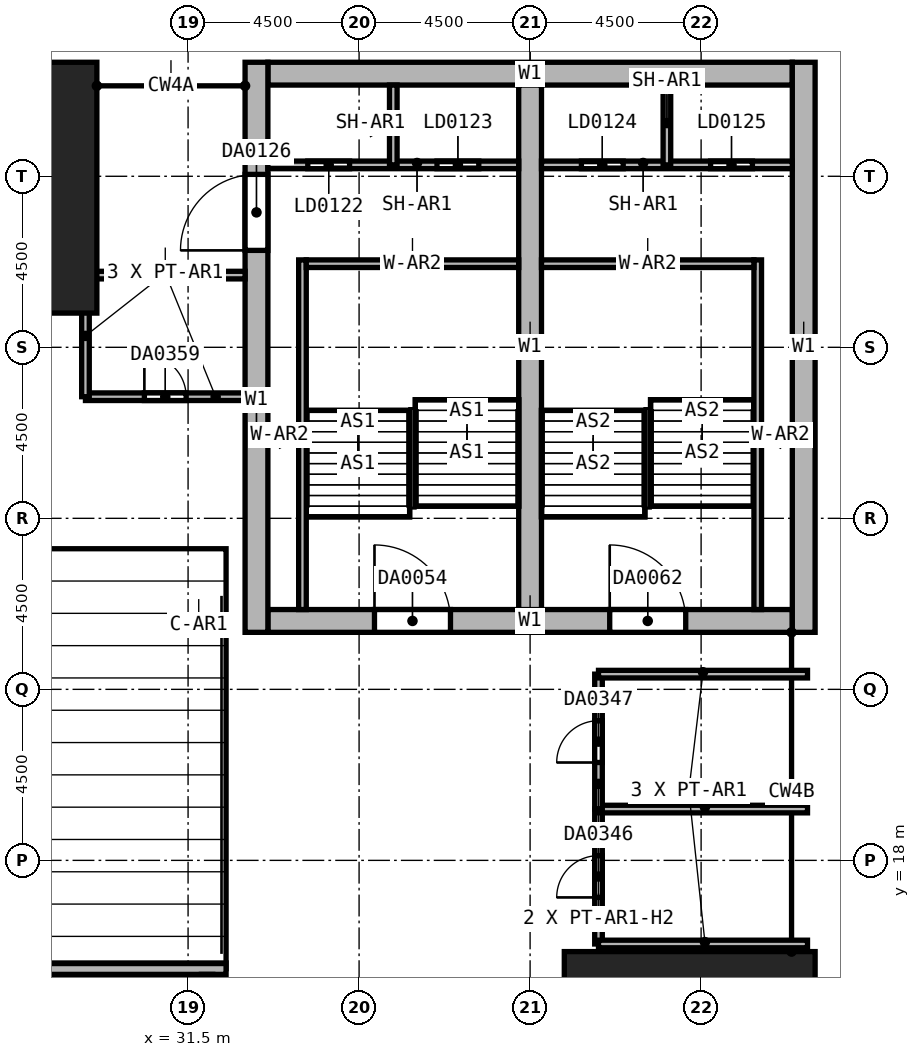
"""IFC4 building model, lengths in metres.
Left out: names, types, materials, properties, quantities, classifications, styles, units other than length and angle.
Written with IfcOpenShell. Run it as: python <this file> out.ifc"""

import sys

from ifc_helpers import new_model, si_unit, direction, frame, frame_2d, origin, origin_2d, place, context, subcontext, project, spatial, rectangle, hollow_rectangle, extrude, element, fill, save


model = new_model("IFC4")
c1 = context("Model", 3, precision=1e-05, world=origin(), true_north=direction((0.0, 1.0)))
c2 = subcontext(c1, "Body", "Model", "MODEL_VIEW")
j1 = project(units=[si_unit("LENGTHUNIT", "METRE"), si_unit("PLANEANGLEUNIT", "RADIAN")], contexts=[c1])
p1 = place(None, origin())
s1 = spatial("IfcSite", under=j1, at=p1, CompositionType="ELEMENT")
p2 = place(p1, origin())
s2 = spatial("IfcBuilding", under=s1, at=p2, CompositionType="ELEMENT")
p3 = place(p2, frame((0.0, 0.0, 12.0)))
s3 = spatial("IfcBuildingStorey", under=s2, at=p3, CompositionType="ELEMENT", Elevation=12.0)
for number, where, z_axis, x_axis in (
    (1, (27.0, 35.7, 0.0), (0.0, 0.0, 1.0), (1.0, 0.0, 0.0)),
    (2, (44.7, 13.5, 0.0), (0.0, 0.0, 1.0), (0.0, 1.0, 0.0)),
):
    element("IfcColumn", number, at=place(p3, frame(where, z_axis=z_axis, x_axis=x_axis)), inside=s3, PredefinedType="COLUMN", context=c2, shape_type="SweptSolid", body=[
        extrude(rectangle(XDim=4.2, YDim=6.6, at=origin_2d()), origin(), (0.0, 0.0, 1.0), 7.0),
    ])
p4 = place(p3, frame((33.6, 38.7, 0.0), z_axis=(0.0, 0.0, 1.0), x_axis=(1.0, 0.0, 0.0)))
e3 = element("IfcWall", 3, at=p4, inside=s3, PredefinedType="SHEAR", context=c2, shape_type="SweptSolid", body=[
    extrude(rectangle(XDim=13.8, YDim=0.6, at=frame_2d((6.9, 0.0))), origin(), (0.0, 0.0, 1.0), 7.0),
])
p5 = place(p3, frame((33.6, 24.3, 0.0), z_axis=(0.0, 0.0, 1.0), x_axis=(1.0, 0.0, 0.0)))
e4 = element("IfcWall", 4, at=p5, inside=s3, PredefinedType="SHEAR", context=c2, shape_type="SweptSolid", body=[
    extrude(rectangle(XDim=13.8, YDim=0.6, at=frame_2d((6.9, 0.0))), origin(), (0.0, 0.0, 1.0), 7.0),
])
p6 = place(p5, frame((2.805, 0.0, 0.0)))
e5 = element("IfcOpeningElement", 5, at=p6, cuts=e4, PredefinedType="OPENING", context=c2, shape_type="SweptSolid", body=[
    extrude(rectangle(XDim=2.0, YDim=2.4, at=frame_2d((1.0, 1.2))), frame((0.0, 0.3, 0.0), z_axis=(0.0, -1.0, 0.0), x_axis=(1.0, 0.0, 0.0)), (0.0, 0.0, 1.0), 0.6),
])
p7 = place(p5, frame((8.995, 0.0, 0.0)))
e6 = element("IfcOpeningElement", 6, at=p7, cuts=e4, PredefinedType="OPENING", context=c2, shape_type="SweptSolid", body=[
    extrude(rectangle(XDim=2.0, YDim=2.4, at=frame_2d((1.0, 1.2))), frame((0.0, 0.3, 0.0), z_axis=(0.0, -1.0, 0.0), x_axis=(1.0, 0.0, 0.0)), (0.0, 0.0, 1.0), 0.6),
])
p8 = place(p3, frame((33.3, 24.0, 0.0), z_axis=(0.0, 0.0, 1.0), x_axis=(0.0, 1.0, 0.0)))
e7 = element("IfcWall", 7, at=p8, inside=s3, PredefinedType="SHEAR", context=c2, shape_type="SweptSolid", body=[
    extrude(rectangle(XDim=15.0, YDim=0.6, at=frame_2d((7.5, 0.0))), origin(), (0.0, 0.0, 1.0), 7.0),
])
p9 = place(p8, frame((10.05, 0.0, 0.0)))
e8 = element("IfcOpeningElement", 8, at=p9, cuts=e7, PredefinedType="OPENING", context=c2, shape_type="SweptSolid", body=[
    extrude(rectangle(XDim=2.0, YDim=2.4, at=frame_2d((1.0, 1.2))), frame((0.0, 0.3, 0.0), z_axis=(0.0, -1.0, 0.0), x_axis=(1.0, 0.0, 0.0)), (0.0, 0.0, 1.0), 0.6),
])
p10 = place(p3, frame((47.7, 24.0, 0.0), z_axis=(0.0, 0.0, 1.0), x_axis=(0.0, 1.0, 0.0)))
e9 = element("IfcWall", 9, at=p10, inside=s3, PredefinedType="SHEAR", context=c2, shape_type="SweptSolid", body=[
    extrude(rectangle(XDim=15.0, YDim=0.6, at=frame_2d((7.5, 0.0))), origin(), (0.0, 0.0, 1.0), 7.0),
])
p11 = place(p3, frame((40.5, 24.6, 0.0), z_axis=(0.0, 0.0, 1.0), x_axis=(0.0, 1.0, 0.0)))
e10 = element("IfcWall", 10, at=p11, inside=s3, PredefinedType="SHEAR", context=c2, shape_type="SweptSolid", body=[
    extrude(rectangle(XDim=13.8, YDim=0.6, at=frame_2d((6.9, 0.0))), origin(), (0.0, 0.0, 1.0), 7.0),
])
p12 = place(p3, frame((-14.1, 15.15, 0.0), z_axis=(0.0, 0.0, 1.0), x_axis=(1.0, 0.0, 0.0)))
e11 = element("IfcWall", 11, at=p12, inside=s3, PredefinedType="SOLIDWALL", context=c2, shape_type="SweptSolid", body=[
    extrude(rectangle(XDim=46.6, YDim=0.3, at=frame_2d((23.3, 0.0))), origin(), (0.0, 0.0, 1.0), 2.125),
])
p13 = place(p3, frame((32.0, 1.95, 0.0), z_axis=(0.0, 0.0, 1.0), x_axis=(0.0, 1.0, 0.0)))
e12 = element("IfcWall", 12, at=p13, inside=s3, PredefinedType="SOLIDWALL", context=c2, shape_type="SweptSolid", body=[
    extrude(rectangle(XDim=13.05, YDim=0.3, at=frame_2d((6.525, 0.0))), origin(), (0.0, 0.0, 1.0), 2.0),
])
p14 = place(p3, frame((31.78, 24.2, 0.0), z_axis=(0.0, 0.0, 1.0), x_axis=(1.0, 0.0, 0.0)))
e13 = element("IfcColumn", 13, at=p14, inside=s3, PredefinedType="COLUMN", context=c2, shape_type="SweptSolid", body=[
    extrude(hollow_rectangle(XDim=0.5, YDim=0.6, WallThickness=0.03, at=origin_2d()), origin(), (0.0, 0.0, 1.0), 5.712),
])
p15 = place(p3, frame((34.51, 24.6, 0.0), z_axis=(0.0, 0.0, 1.0), x_axis=(0.0, 1.0, 0.0)))
e14 = element("IfcWall", 14, at=p15, inside=s3, PredefinedType="SOLIDWALL", context=c2, shape_type="SweptSolid", body=[
    extrude(rectangle(XDim=9.2, YDim=0.2, at=frame_2d((4.6, 0.0))), origin(), (0.0, 0.0, 1.0), 7.0),
])
p16 = place(p3, frame((34.61, 33.7, 0.0), z_axis=(0.0, 0.0, 1.0), x_axis=(1.0, 0.0, 0.0)))
e15 = element("IfcWall", 15, at=p16, inside=s3, PredefinedType="SOLIDWALL", context=c2, shape_type="SweptSolid", body=[
    extrude(rectangle(XDim=5.59, YDim=0.2, at=frame_2d((2.795, 0.0))), origin(), (0.0, 0.0, 1.0), 7.0),
])
p17 = place(p3, frame((46.49, 24.6, 0.0), z_axis=(0.0, 0.0, 1.0), x_axis=(0.0, 1.0, 0.0)))
e16 = element("IfcWall", 16, at=p17, inside=s3, PredefinedType="SOLIDWALL", context=c2, shape_type="SweptSolid", body=[
    extrude(rectangle(XDim=9.2, YDim=0.2, at=frame_2d((4.6, 0.0))), origin(), (0.0, 0.0, 1.0), 7.0),
])
p18 = place(p3, frame((40.8, 33.7, 0.0), z_axis=(0.0, 0.0, 1.0), x_axis=(1.0, 0.0, 0.0)))
e17 = element("IfcWall", 17, at=p18, inside=s3, PredefinedType="SOLIDWALL", context=c2, shape_type="SweptSolid", body=[
    extrude(rectangle(XDim=5.59, YDim=0.2, at=frame_2d((2.795, 0.0))), origin(), (0.0, 0.0, 1.0), 7.0),
])
p19 = place(p3, frame((33.6, 36.3, 0.0), z_axis=(0.0, 0.0, 1.0), x_axis=(1.0, 0.0, 0.0)))
e18 = element("IfcWall", 18, at=p19, inside=s3, PredefinedType="SHEAR", context=c2, shape_type="SweptSolid", body=[
    extrude(rectangle(XDim=6.6, YDim=0.2, at=frame_2d((3.3, 0.0))), origin(), (0.0, 0.0, 1.0), 7.0),
])
p20 = place(p19, frame((1.05, 0.0, 0.0)))
e19 = element("IfcOpeningElement", 19, at=p20, cuts=e18, PredefinedType="OPENING", context=c2, shape_type="SweptSolid", body=[
    extrude(rectangle(XDim=1.1, YDim=2.4, at=frame_2d((0.55, 1.2))), frame((0.0, 0.1, 0.0), z_axis=(0.0, -1.0, 0.0), x_axis=(1.0, 0.0, 0.0)), (0.0, 0.0, 1.0), 0.2),
])
p21 = place(p19, frame((4.45, 0.0, 0.0)))
e20 = element("IfcOpeningElement", 20, at=p21, cuts=e18, PredefinedType="OPENING", context=c2, shape_type="SweptSolid", body=[
    extrude(rectangle(XDim=1.1, YDim=2.4, at=frame_2d((0.55, 1.2))), frame((0.0, 0.1, 0.0), z_axis=(0.0, -1.0, 0.0), x_axis=(1.0, 0.0, 0.0)), (0.0, 0.0, 1.0), 0.2),
])
p22 = place(p3, frame((40.8, 36.3, 0.0), z_axis=(0.0, 0.0, 1.0), x_axis=(1.0, 0.0, 0.0)))
e21 = element("IfcWall", 21, at=p22, inside=s3, PredefinedType="SHEAR", context=c2, shape_type="SweptSolid", body=[
    extrude(rectangle(XDim=6.6, YDim=0.2, at=frame_2d((3.3, 0.0))), origin(), (0.0, 0.0, 1.0), 7.0),
])
p23 = place(p22, frame((1.05, 0.0, 0.0)))
e22 = element("IfcOpeningElement", 22, at=p23, cuts=e21, PredefinedType="OPENING", context=c2, shape_type="SweptSolid", body=[
    extrude(rectangle(XDim=1.1, YDim=2.4, at=frame_2d((0.55, 1.2))), frame((0.0, 0.1, 0.0), z_axis=(0.0, -1.0, 0.0), x_axis=(1.0, 0.0, 0.0)), (0.0, 0.0, 1.0), 0.2),
])
p24 = place(p22, frame((4.45, 0.0, 0.0)))
e23 = element("IfcOpeningElement", 23, at=p24, cuts=e21, PredefinedType="OPENING", context=c2, shape_type="SweptSolid", body=[
    extrude(rectangle(XDim=1.1, YDim=2.4, at=frame_2d((0.55, 1.2))), frame((0.0, 0.1, 0.0), z_axis=(0.0, -1.0, 0.0), x_axis=(1.0, 0.0, 0.0)), (0.0, 0.0, 1.0), 0.2),
])
for number, where, z_axis, x_axis in (
    (24, (36.9, 36.3, 0.0), (0.0, 0.0, 1.0), (0.0, 1.0, 0.0)),
    (25, (44.1, 36.3, 0.0), (0.0, 0.0, 1.0), (0.0, 1.0, 0.0)),
):
    element("IfcWall", number, at=place(p3, frame(where, z_axis=z_axis, x_axis=x_axis)), inside=s3, PredefinedType="SHEAR", context=c2, shape_type="SweptSolid", body=[
        extrude(rectangle(XDim=2.1, YDim=0.2, at=frame_2d((1.05, 0.0))), origin(), (0.0, 0.0, 1.0), 7.0),
    ])
p25 = place(p3, frame((42.3, 15.8, 0.0), z_axis=(0.0, 0.0, 1.0), x_axis=(0.0, 1.0, 0.0)))
e26 = element("IfcWall", 26, at=p25, inside=s3, PredefinedType="PARTITIONING", context=c2, shape_type="SweptSolid", body=[
    extrude(rectangle(XDim=3.55, YDim=0.2, at=frame_2d((1.775, 0.0))), origin(), (0.0, 0.0, 1.0), 5.5),
])
p26 = place(p25, frame((1.225, 0.0, 0.0)))
e27 = element("IfcOpeningElement", 27, at=p26, cuts=e26, PredefinedType="OPENING", context=c2, shape_type="SweptSolid", body=[
    extrude(rectangle(XDim=1.1, YDim=2.4, at=frame_2d((0.55, 1.2))), frame((0.0, 0.1, 0.0), z_axis=(0.0, -1.0, 0.0), x_axis=(1.0, 0.0, 0.0)), (0.0, 0.0, 1.0), 0.2),
])
for number, where, z_axis, x_axis in (
    (28, (42.3, 15.8, 0.0), (0.0, 0.0, 1.0), (1.0, 0.0, 0.0)),
    (29, (42.3, 19.35, 0.0), (0.0, 0.0, 1.0), (1.0, 0.0, 0.0)),
):
    element("IfcWall", number, at=place(p3, frame(where, z_axis=z_axis, x_axis=x_axis)), inside=s3, PredefinedType="PARTITIONING", context=c2, shape_type="SweptSolid", body=[
        extrude(rectangle(XDim=5.5, YDim=0.2, at=frame_2d((2.75, 0.0))), origin(), (0.0, 0.0, 1.0), 6.7),
    ])
p27 = place(p3, frame((42.3, 19.35, 0.0), z_axis=(0.0, 0.0, 1.0), x_axis=(0.0, 1.0, 0.0)))
e30 = element("IfcWall", 30, at=p27, inside=s3, PredefinedType="PARTITIONING", context=c2, shape_type="SweptSolid", body=[
    extrude(rectangle(XDim=3.55, YDim=0.2, at=frame_2d((1.775, 0.0))), origin(), (0.0, 0.0, 1.0), 5.5),
])
p28 = place(p27, frame((1.225, 0.0, 0.0)))
e31 = element("IfcOpeningElement", 31, at=p28, cuts=e30, PredefinedType="OPENING", context=c2, shape_type="SweptSolid", body=[
    extrude(rectangle(XDim=1.1, YDim=2.4, at=frame_2d((0.55, 1.2))), frame((0.0, 0.1, 0.0), z_axis=(0.0, -1.0, 0.0), x_axis=(1.0, 0.0, 0.0)), (0.0, 0.0, 1.0), 0.2),
])
p29 = place(p3, frame((42.3, 22.9, 0.0), z_axis=(0.0, 0.0, 1.0), x_axis=(1.0, 0.0, 0.0)))
e32 = element("IfcWall", 32, at=p29, inside=s3, PredefinedType="PARTITIONING", context=c2, shape_type="SweptSolid", body=[
    extrude(rectangle(XDim=5.5, YDim=0.2, at=frame_2d((2.75, 0.0))), origin(), (0.0, 0.0, 1.0), 6.7),
])
p30 = place(p3, frame((28.8, 30.2, 0.0), z_axis=(0.0, 0.0, 1.0), x_axis=(1.0, 0.0, 0.0)))
e33 = element("IfcWall", 33, at=p30, inside=s3, PredefinedType="PARTITIONING", context=c2, shape_type="SweptSolid", body=[
    extrude(rectangle(XDim=4.2, YDim=0.2, at=frame_2d((2.1, 0.0))), origin(), (0.0, 0.0, 1.0), 6.7),
])
p31 = place(p30, frame((1.55, 0.0, 0.0)))
e34 = element("IfcOpeningElement", 34, at=p31, cuts=e33, PredefinedType="OPENING", context=c2, shape_type="SweptSolid", body=[
    extrude(rectangle(XDim=1.1, YDim=2.4, at=frame_2d((0.55, 1.2))), frame((0.0, 0.1, 0.0), z_axis=(0.0, -1.0, 0.0), x_axis=(1.0, 0.0, 0.0)), (0.0, 0.0, 1.0), 0.2),
])
p32 = place(p3, frame((28.8, 30.2, 0.0), z_axis=(0.0, 0.0, 1.0), x_axis=(0.0, 1.0, 0.0)))
e35 = element("IfcWall", 35, at=p32, inside=s3, PredefinedType="PARTITIONING", context=c2, shape_type="SweptSolid", body=[
    extrude(rectangle(XDim=3.2, YDim=0.2, at=frame_2d((1.6, 0.0))), origin(), (0.0, 0.0, 1.0), 6.7),
])
p33 = place(p3, frame((28.8, 33.4, 0.0), z_axis=(0.0, 0.0, 1.0), x_axis=(1.0, 0.0, 0.0)))
e36 = element("IfcWall", 36, at=p33, inside=s3, PredefinedType="PARTITIONING", context=c2, shape_type="SweptSolid", body=[
    extrude(rectangle(XDim=4.2, YDim=0.2, at=frame_2d((2.1, 0.0))), origin(), (0.0, 0.0, 1.0), 6.7),
])
p34 = place(p6, origin())
e37 = element("IfcDoor", 37, at=p34, inside=s3, OperationType="DOUBLE_DOOR_SINGLE_SWING", PredefinedType="DOOR", context=c2, shape_type="SweptSolid", body=[
    extrude(rectangle(XDim=2.0, YDim=2.4, at=frame_2d((1.0, 1.2))), frame((0.0, 0.025, 0.0), z_axis=(0.0, -1.0, 0.0), x_axis=(1.0, 0.0, 0.0)), (0.0, 0.0, 1.0), 0.05),
])
fill(e5, e37)
p35 = place(p7, origin())
e38 = element("IfcDoor", 38, at=p35, inside=s3, OperationType="DOUBLE_DOOR_SINGLE_SWING", PredefinedType="DOOR", context=c2, shape_type="SweptSolid", body=[
    extrude(rectangle(XDim=2.0, YDim=2.4, at=frame_2d((1.0, 1.2))), frame((0.0, 0.025, 0.0), z_axis=(0.0, -1.0, 0.0), x_axis=(1.0, 0.0, 0.0)), (0.0, 0.0, 1.0), 0.05),
])
fill(e6, e38)
p36 = place(p20, origin())
e39 = element("IfcDoor", 39, at=p36, inside=s3, OperationType="DOUBLE_DOOR_SLIDING", PredefinedType="DOOR", context=c2, shape_type="SweptSolid", body=[
    extrude(rectangle(XDim=1.1, YDim=2.4, at=frame_2d((0.55, 1.2))), frame((0.0, 0.025, 0.0), z_axis=(0.0, -1.0, 0.0), x_axis=(1.0, 0.0, 0.0)), (0.0, 0.0, 1.0), 0.05),
])
fill(e19, e39)
p37 = place(p21, origin())
e40 = element("IfcDoor", 40, at=p37, inside=s3, OperationType="DOUBLE_DOOR_SLIDING", PredefinedType="DOOR", context=c2, shape_type="SweptSolid", body=[
    extrude(rectangle(XDim=1.1, YDim=2.4, at=frame_2d((0.55, 1.2))), frame((0.0, 0.025, 0.0), z_axis=(0.0, -1.0, 0.0), x_axis=(1.0, 0.0, 0.0)), (0.0, 0.0, 1.0), 0.05),
])
fill(e20, e40)
p38 = place(p23, origin())
e41 = element("IfcDoor", 41, at=p38, inside=s3, OperationType="DOUBLE_DOOR_SLIDING", PredefinedType="DOOR", context=c2, shape_type="SweptSolid", body=[
    extrude(rectangle(XDim=1.1, YDim=2.4, at=frame_2d((0.55, 1.2))), frame((0.0, 0.025, 0.0), z_axis=(0.0, -1.0, 0.0), x_axis=(1.0, 0.0, 0.0)), (0.0, 0.0, 1.0), 0.05),
])
fill(e22, e41)
p39 = place(p24, origin())
e42 = element("IfcDoor", 42, at=p39, inside=s3, OperationType="DOUBLE_DOOR_SLIDING", PredefinedType="DOOR", context=c2, shape_type="SweptSolid", body=[
    extrude(rectangle(XDim=1.1, YDim=2.4, at=frame_2d((0.55, 1.2))), frame((0.0, 0.025, 0.0), z_axis=(0.0, -1.0, 0.0), x_axis=(1.0, 0.0, 0.0)), (0.0, 0.0, 1.0), 0.05),
])
fill(e23, e42)
p40 = place(p9, origin())
e43 = element("IfcDoor", 43, at=p40, inside=s3, OperationType="DOUBLE_DOOR_SINGLE_SWING", PredefinedType="DOOR", context=c2, shape_type="SweptSolid", body=[
    extrude(rectangle(XDim=2.0, YDim=2.4, at=frame_2d((1.0, 1.2))), frame((0.0, 0.025, 0.0), z_axis=(0.0, -1.0, 0.0), x_axis=(1.0, 0.0, 0.0)), (0.0, 0.0, 1.0), 0.05),
])
fill(e8, e43)
p41 = place(p26, origin())
e44 = element("IfcDoor", 44, at=p41, inside=s3, OperationType="DOUBLE_DOOR_SINGLE_SWING", PredefinedType="DOOR", context=c2, shape_type="SweptSolid", body=[
    extrude(rectangle(XDim=1.1, YDim=2.4, at=frame_2d((0.55, 1.2))), frame((0.0, 0.025, 0.0), z_axis=(0.0, -1.0, 0.0), x_axis=(1.0, 0.0, 0.0)), (0.0, 0.0, 1.0), 0.05),
])
fill(e27, e44)
p42 = place(p28, origin())
e45 = element("IfcDoor", 45, at=p42, inside=s3, OperationType="DOUBLE_DOOR_SINGLE_SWING", PredefinedType="DOOR", context=c2, shape_type="SweptSolid", body=[
    extrude(rectangle(XDim=1.1, YDim=2.4, at=frame_2d((0.55, 1.2))), frame((0.0, 0.025, 0.0), z_axis=(0.0, -1.0, 0.0), x_axis=(1.0, 0.0, 0.0)), (0.0, 0.0, 1.0), 0.05),
])
fill(e31, e45)
p43 = place(p31, origin())
e46 = element("IfcDoor", 46, at=p43, inside=s3, OperationType="DOUBLE_DOOR_SINGLE_SWING", PredefinedType="DOOR", context=c2, shape_type="SweptSolid", body=[
    extrude(rectangle(XDim=1.1, YDim=2.4, at=frame_2d((0.55, 1.2))), frame((0.0, 0.025, 0.0), z_axis=(0.0, -1.0, 0.0), x_axis=(1.0, 0.0, 0.0)), (0.0, 0.0, 1.0), 0.05),
])
fill(e34, e46)
save(model, sys.argv[1])
